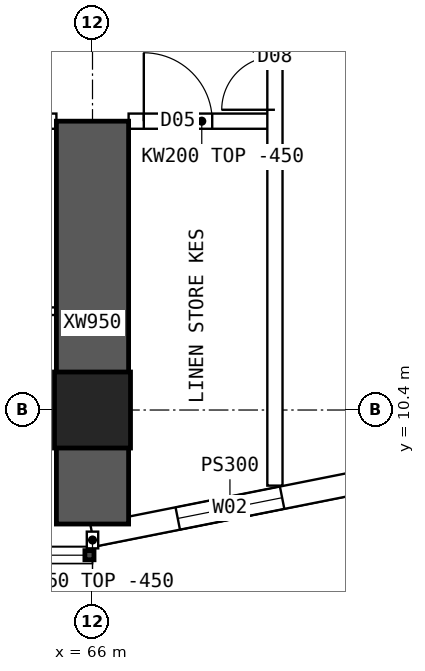
"""IFC4 building model, lengths in metres.
Left out: names, types, materials, properties, quantities, classifications, styles, units other than length and angle.
Written with IfcOpenShell. Run it as: python <this file> out.ifc"""

import sys

from ifc_helpers import new_model, si_unit, direction, frame, frame_2d, origin, origin_2d, place, context, subcontext, project, spatial, polyline, rectangle, hollow_rectangle, outline, extrude, element, fill, save


model = new_model("IFC4")
c1 = context("Model", 3, precision=1e-05, world=origin(), true_north=direction((0.0, 1.0)))
c2 = subcontext(c1, "Body", "Model", "MODEL_VIEW")
j1 = project(units=[si_unit("LENGTHUNIT", "METRE"), si_unit("PLANEANGLEUNIT", "RADIAN")], contexts=[c1])
p1 = place(None, origin())
s1 = spatial("IfcSite", under=j1, at=p1, CompositionType="ELEMENT")
p2 = place(p1, origin())
s2 = spatial("IfcBuilding", under=s1, at=p2, CompositionType="ELEMENT")
p3 = place(p2, frame((0.0, 0.0, 80.65)))
s3 = spatial("IfcBuildingStorey", under=s2, at=p3, CompositionType="ELEMENT", Elevation=80.65)
p4 = place(p3, frame((66.0, 10.4, 0.0), z_axis=(0.0, 0.0, 1.0), x_axis=(1.0, 0.0, 0.0)))
e1 = element("IfcColumn", 1, at=p4, inside=s3, PredefinedType="COLUMN", context=c2, shape_type="SweptSolid", body=[
    extrude(hollow_rectangle(XDim=1.0, YDim=1.0, WallThickness=0.1, at=origin_2d()), origin(), (0.0, 0.0, 1.0), 3.75),
])
p5 = place(p3, frame((66.0, 8.9, 0.0), z_axis=(0.0, 0.0, 1.0), x_axis=(0.0, 1.0, 0.0)))
e2 = element("IfcWall", 2, at=p5, inside=s3, PredefinedType="SHEAR", context=c2, shape_type="SweptSolid", body=[
    extrude(rectangle(XDim=5.3, YDim=0.95, at=frame_2d((2.65, 0.0))), origin(), (0.0, 0.0, 1.0), 3.75),
])
p6 = place(p3, frame((66.0, 8.75, 0.0), z_axis=(0.0, 0.0, 1.0), x_axis=(0.980791473772, 0.195059183267, 0.0)))
e3 = element("IfcWall", 3, at=p6, inside=s3, PredefinedType="SOLIDWALL", context=c2, shape_type="SweptSolid", body=[
    extrude(outline(polyline([(-0.03, -0.15), (3.717, -0.15), (3.657, 0.15), (0.03, 0.15), (-0.03, -0.15)])), origin(), (0.0, 0.0, 1.0), 3.3),
])
p7 = place(p6, frame((1.144, 0.0, 0.9)))
e4 = element("IfcOpeningElement", 4, at=p7, cuts=e3, PredefinedType="OPENING", context=c2, shape_type="SweptSolid", body=[
    extrude(rectangle(XDim=1.4, YDim=1.8, at=frame_2d((0.7, 0.9))), frame((0.0, 0.16, 0.0), z_axis=(0.0, -1.0, 0.0), x_axis=(1.0, 0.0, 0.0)), (0.0, 0.0, 1.0), 0.32),
])
p8 = place(p3, frame((60.475, 14.2, 0.0), z_axis=(0.0, 0.0, 1.0), x_axis=(1.0, 0.0, 0.0)))
e5 = element("IfcWall", 5, at=p8, inside=s3, PredefinedType="SOLIDWALL", context=c2, shape_type="SweptSolid", body=[
    extrude(outline(polyline([(0.0, 0.0), (5.05, 0.0), (5.05, 2.9), (0.0, 2.9), (0.0, 0.0)])), frame((0.0, 0.1, 0.0), z_axis=(0.0, -1.0, 0.0), x_axis=(1.0, 0.0, 0.0)), (0.0, 0.0, 1.0), 0.2),
])
p9 = place(p8, frame((1.45, 0.0, 0.0)))
e6 = element("IfcOpeningElement", 6, at=p9, cuts=e5, PredefinedType="OPENING", context=c2, shape_type="SweptSolid", body=[
    extrude(rectangle(XDim=0.9, YDim=2.1, at=frame_2d((0.45, 1.05))), frame((0.0, 0.11, 0.0), z_axis=(0.0, -1.0, 0.0), x_axis=(1.0, 0.0, 0.0)), (0.0, 0.0, 1.0), 0.22),
])
p10 = place(p8, frame((2.7, 0.0, 0.0)))
e7 = element("IfcOpeningElement", 7, at=p10, cuts=e5, PredefinedType="OPENING", context=c2, shape_type="SweptSolid", body=[
    extrude(rectangle(XDim=0.9, YDim=2.1, at=frame_2d((0.45, 1.05))), frame((0.0, 0.11, 0.0), z_axis=(0.0, -1.0, 0.0), x_axis=(1.0, 0.0, 0.0)), (0.0, 0.0, 1.0), 0.22),
])
p11 = place(p3, frame((66.475, 14.2, 0.0), z_axis=(0.0, 0.0, 1.0), x_axis=(1.0, 0.0, 0.0)))
e8 = element("IfcWall", 8, at=p11, inside=s3, PredefinedType="SOLIDWALL", context=c2, shape_type="SweptSolid", body=[
    extrude(rectangle(XDim=1.925, YDim=0.2, at=frame_2d((0.962, 0.0))), origin(), (0.0, 0.0, 1.0), 3.3),
])
p12 = place(p11, frame((0.2, 0.0, 0.0)))
e9 = element("IfcOpeningElement", 9, at=p12, cuts=e8, PredefinedType="OPENING", context=c2, shape_type="SweptSolid", body=[
    extrude(rectangle(XDim=0.9, YDim=2.1, at=frame_2d((0.45, 1.05))), frame((0.0, 0.11, 0.0), z_axis=(0.0, -1.0, 0.0), x_axis=(1.0, 0.0, 0.0)), (0.0, 0.0, 1.0), 0.22),
])
p13 = place(p3, frame((65.525, 11.7, 0.0), z_axis=(0.0, 0.0, 1.0), x_axis=(-1.0, 0.0, 0.0)))
e10 = element("IfcWall", 10, at=p13, inside=s3, PredefinedType="PARTITIONING", context=c2, shape_type="SweptSolid", body=[
    extrude(rectangle(XDim=1.4, YDim=0.1, at=frame_2d((0.7, 0.0))), origin(), (0.0, 0.0, 1.0), 3.3),
])
p14 = place(p13, frame((0.25, 0.0, 0.0)))
e11 = element("IfcOpeningElement", 11, at=p14, cuts=e10, PredefinedType="OPENING", context=c2, shape_type="SweptSolid", body=[
    extrude(rectangle(XDim=0.9, YDim=2.1, at=frame_2d((0.45, 1.05))), frame((0.0, 0.06, 0.0), z_axis=(0.0, -1.0, 0.0), x_axis=(1.0, 0.0, 0.0)), (0.0, 0.0, 1.0), 0.12),
])
p15 = place(p3, frame((68.4, 9.405, 0.0), z_axis=(0.0, 0.0, 1.0), x_axis=(0.0, 1.0, 0.0)))
e12 = element("IfcWall", 12, at=p15, inside=s3, PredefinedType="SOLIDWALL", context=c2, shape_type="SweptSolid", body=[
    extrude(rectangle(XDim=45.189, YDim=0.2, at=frame_2d((22.595, 0.0))), origin(), (0.0, 0.0, 1.0), 3.3),
])
p16 = place(p15, frame((30.195, 0.0, 0.0)))
e13 = element("IfcOpeningElement", 13, at=p16, cuts=e12, PredefinedType="OPENING", context=c2, shape_type="SweptSolid", body=[
    extrude(rectangle(XDim=1.2, YDim=2.1, at=frame_2d((0.6, 1.05))), frame((0.0, 0.11, 0.0), z_axis=(0.0, -1.0, 0.0), x_axis=(1.0, 0.0, 0.0)), (0.0, 0.0, 1.0), 0.22),
])
p17 = place(p15, frame((4.945, 0.0, 0.0)))
e14 = element("IfcOpeningElement", 14, at=p17, cuts=e12, PredefinedType="OPENING", context=c2, shape_type="SweptSolid", body=[
    extrude(rectangle(XDim=1.4, YDim=2.1, at=frame_2d((0.7, 1.05))), frame((0.0, 0.11, 0.0), z_axis=(0.0, -1.0, 0.0), x_axis=(1.0, 0.0, 0.0)), (0.0, 0.0, 1.0), 0.22),
])
p18 = place(p15, frame((38.745, 0.0, 0.0)))
e15 = element("IfcOpeningElement", 15, at=p18, cuts=e12, PredefinedType="OPENING", context=c2, shape_type="SweptSolid", body=[
    extrude(rectangle(XDim=1.4, YDim=2.1, at=frame_2d((0.7, 1.05))), frame((0.0, 0.11, 0.0), z_axis=(0.0, -1.0, 0.0), x_axis=(1.0, 0.0, 0.0)), (0.0, 0.0, 1.0), 0.22),
])
p19 = place(p3, frame((66.0, 8.8, 0.0), z_axis=(0.0, 0.0, 1.0), x_axis=(0.0, -1.0, 0.0)))
e16 = element("IfcWall", 16, at=p19, inside=s3, PredefinedType="PARTITIONING", context=c2, shape_type="SweptSolid", body=[
    extrude(rectangle(XDim=0.22, YDim=0.15, at=frame_2d((0.11, 0.0))), origin(), (0.0, 0.0, 1.0), 3.3),
])
p20 = place(p7, origin())
e17 = element("IfcWindow", 17, at=p20, inside=s3, PartitioningType="SINGLE_PANEL", PredefinedType="WINDOW", context=c2, shape_type="SweptSolid", body=[
    extrude(rectangle(XDim=1.4, YDim=1.8, at=frame_2d((0.7, 0.9))), frame((0.0, 0.03, 0.0), z_axis=(0.0, -1.0, 0.0), x_axis=(1.0, 0.0, 0.0)), (0.0, 0.0, 1.0), 0.06),
])
fill(e4, e17)
p21 = place(p17, origin())
e18 = element("IfcDoor", 18, at=p21, inside=s3, OperationType="DOUBLE_DOOR_SINGLE_SWING", PredefinedType="DOOR", context=c2, shape_type="SweptSolid", body=[
    extrude(rectangle(XDim=1.4, YDim=2.1, at=frame_2d((0.7, 1.05))), frame((0.0, 0.025, 0.0), z_axis=(0.0, -1.0, 0.0), x_axis=(1.0, 0.0, 0.0)), (0.0, 0.0, 1.0), 0.05),
])
fill(e14, e18)
p22 = place(p12, origin())
e19 = element("IfcDoor", 19, at=p22, inside=s3, OperationType="SINGLE_SWING_LEFT", PredefinedType="DOOR", context=c2, shape_type="SweptSolid", body=[
    extrude(rectangle(XDim=0.9, YDim=2.1, at=frame_2d((0.45, 1.05))), frame((0.0, 0.025, 0.0), z_axis=(0.0, -1.0, 0.0), x_axis=(1.0, 0.0, 0.0)), (0.0, 0.0, 1.0), 0.05),
])
fill(e9, e19)
save(model, sys.argv[1])
